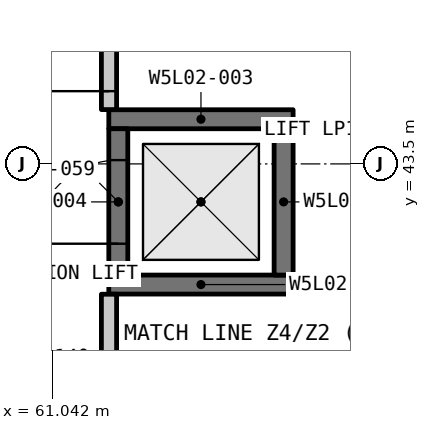
"""IFC4 building model, lengths in metres.
Left out: names, types, materials, properties, quantities, classifications, styles, units other than length and angle.
Written with IfcOpenShell. Run it as: python <this file> out.ifc"""

import sys

from ifc_helpers import new_model, si_unit, direction, frame, frame_2d, origin, place, context, subcontext, project, spatial, rectangle, extrude, element, fill, save


model = new_model("IFC4")
c1 = context("Model", 3, precision=1e-05, world=origin(), true_north=direction((0.0, 1.0)))
c2 = subcontext(c1, "Body", "Model", "MODEL_VIEW")
j1 = project(units=[si_unit("LENGTHUNIT", "METRE"), si_unit("PLANEANGLEUNIT", "RADIAN")], contexts=[c1])
p1 = place(None, origin())
s1 = spatial("IfcSite", under=j1, at=p1, CompositionType="ELEMENT")
p2 = place(p1, origin())
s2 = spatial("IfcBuilding", under=s1, at=p2, CompositionType="ELEMENT")
p3 = place(p2, frame((0.0, 0.0, 11.25)))
s3 = spatial("IfcBuildingStorey", under=s2, at=p3, CompositionType="ELEMENT", Elevation=11.25)
p4 = place(p3, frame((61.788, 41.913, -0.3), z_axis=(0.0, 0.0, 1.0), x_axis=(1.0, 0.0, 0.0)))
e1 = element("IfcWall", 1, at=p4, inside=s3, PredefinedType="SHEAR", context=c2, shape_type="SweptSolid", body=[
    extrude(rectangle(XDim=2.425, YDim=0.25, at=frame_2d((1.212, 0.0))), origin(), (0.0, 0.0, 1.0), 4.5),
])
p5 = place(p3, frame((64.087, 42.038, -0.3), z_axis=(0.0, 0.0, 1.0), x_axis=(0.0, 1.0, 0.0)))
e2 = element("IfcWall", 2, at=p5, inside=s3, PredefinedType="SHEAR", context=c2, shape_type="SweptSolid", body=[
    extrude(rectangle(XDim=1.925, YDim=0.25, at=frame_2d((0.962, 0.0))), origin(), (0.0, 0.0, 1.0), 4.5),
])
p6 = place(p3, frame((61.788, 44.087, -0.3), z_axis=(0.0, 0.0, 1.0), x_axis=(1.0, 0.0, 0.0)))
e3 = element("IfcWall", 3, at=p6, inside=s3, PredefinedType="SHEAR", context=c2, shape_type="SweptSolid", body=[
    extrude(rectangle(XDim=2.425, YDim=0.25, at=frame_2d((1.212, 0.0))), origin(), (0.0, 0.0, 1.0), 4.5),
])
p7 = place(p3, frame((61.913, 42.038, -0.3), z_axis=(0.0, 0.0, 1.0), x_axis=(0.0, 1.0, 0.0)))
e4 = element("IfcWall", 4, at=p7, inside=s3, PredefinedType="SHEAR", context=c2, shape_type="SweptSolid", body=[
    extrude(rectangle(XDim=1.925, YDim=0.25, at=frame_2d((0.962, 0.0))), origin(), (0.0, 0.0, 1.0), 4.5),
])
p8 = place(p7, frame((0.413, 0.0, 0.3)))
e5 = element("IfcOpeningElement", 5, at=p8, cuts=e4, PredefinedType="OPENING", context=c2, shape_type="SweptSolid", body=[
    extrude(rectangle(XDim=1.1, YDim=2.1, at=frame_2d((0.55, 1.05))), frame((0.0, 0.135, 0.0), z_axis=(0.0, -1.0, 0.0), x_axis=(1.0, 0.0, 0.0)), (0.0, 0.0, 1.0), 0.27),
])
p9 = place(p3, frame((61.79, 40.1, 0.0), z_axis=(0.0, 0.0, 1.0), x_axis=(0.0, 1.0, 0.0)))
e6 = element("IfcWall", 6, at=p9, inside=s3, PredefinedType="PARTITIONING", context=c2, shape_type="SweptSolid", body=[
    extrude(rectangle(XDim=1.685, YDim=0.2, at=frame_2d((0.843, 0.0))), origin(), (0.0, 0.0, 1.0), 4.2),
])
p10 = place(p3, frame((61.79, 44.215, 0.0), z_axis=(0.0, 0.0, 1.0), x_axis=(0.0, 1.0, 0.0)))
e7 = element("IfcWall", 7, at=p10, inside=s3, PredefinedType="PARTITIONING", context=c2, shape_type="SweptSolid", body=[
    extrude(rectangle(XDim=1.885, YDim=0.2, at=frame_2d((0.943, 0.0))), origin(), (0.0, 0.0, 1.0), 4.2),
])
p11 = place(p10, frame((0.242, 0.0, 0.0)))
e8 = element("IfcOpeningElement", 8, at=p11, cuts=e7, PredefinedType="OPENING", context=c2, shape_type="SweptSolid", body=[
    extrude(rectangle(XDim=1.5, YDim=2.1, at=frame_2d((0.75, 1.05))), frame((0.0, 0.11, 0.0), z_axis=(0.0, -1.0, 0.0), x_axis=(1.0, 0.0, 0.0)), (0.0, 0.0, 1.0), 0.22),
])
p12 = place(p8, origin())
e9 = element("IfcDoor", 9, at=p12, inside=s3, OperationType="DOUBLE_DOOR_SLIDING", PredefinedType="DOOR", context=c2, shape_type="SweptSolid", body=[
    extrude(rectangle(XDim=1.1, YDim=2.1, at=frame_2d((0.55, 1.05))), frame((0.0, 0.025, 0.0), z_axis=(0.0, -1.0, 0.0), x_axis=(1.0, 0.0, 0.0)), (0.0, 0.0, 1.0), 0.05),
])
fill(e5, e9)
p13 = place(p11, origin())
e10 = element("IfcDoor", 10, at=p13, inside=s3, OperationType="DOUBLE_DOOR_SINGLE_SWING", PredefinedType="DOOR", context=c2, shape_type="SweptSolid", body=[
    extrude(rectangle(XDim=1.5, YDim=2.1, at=frame_2d((0.75, 1.05))), frame((0.0, 0.025, 0.0), z_axis=(0.0, -1.0, 0.0), x_axis=(1.0, 0.0, 0.0)), (0.0, 0.0, 1.0), 0.05),
])
fill(e8, e10)
save(model, sys.argv[1])
